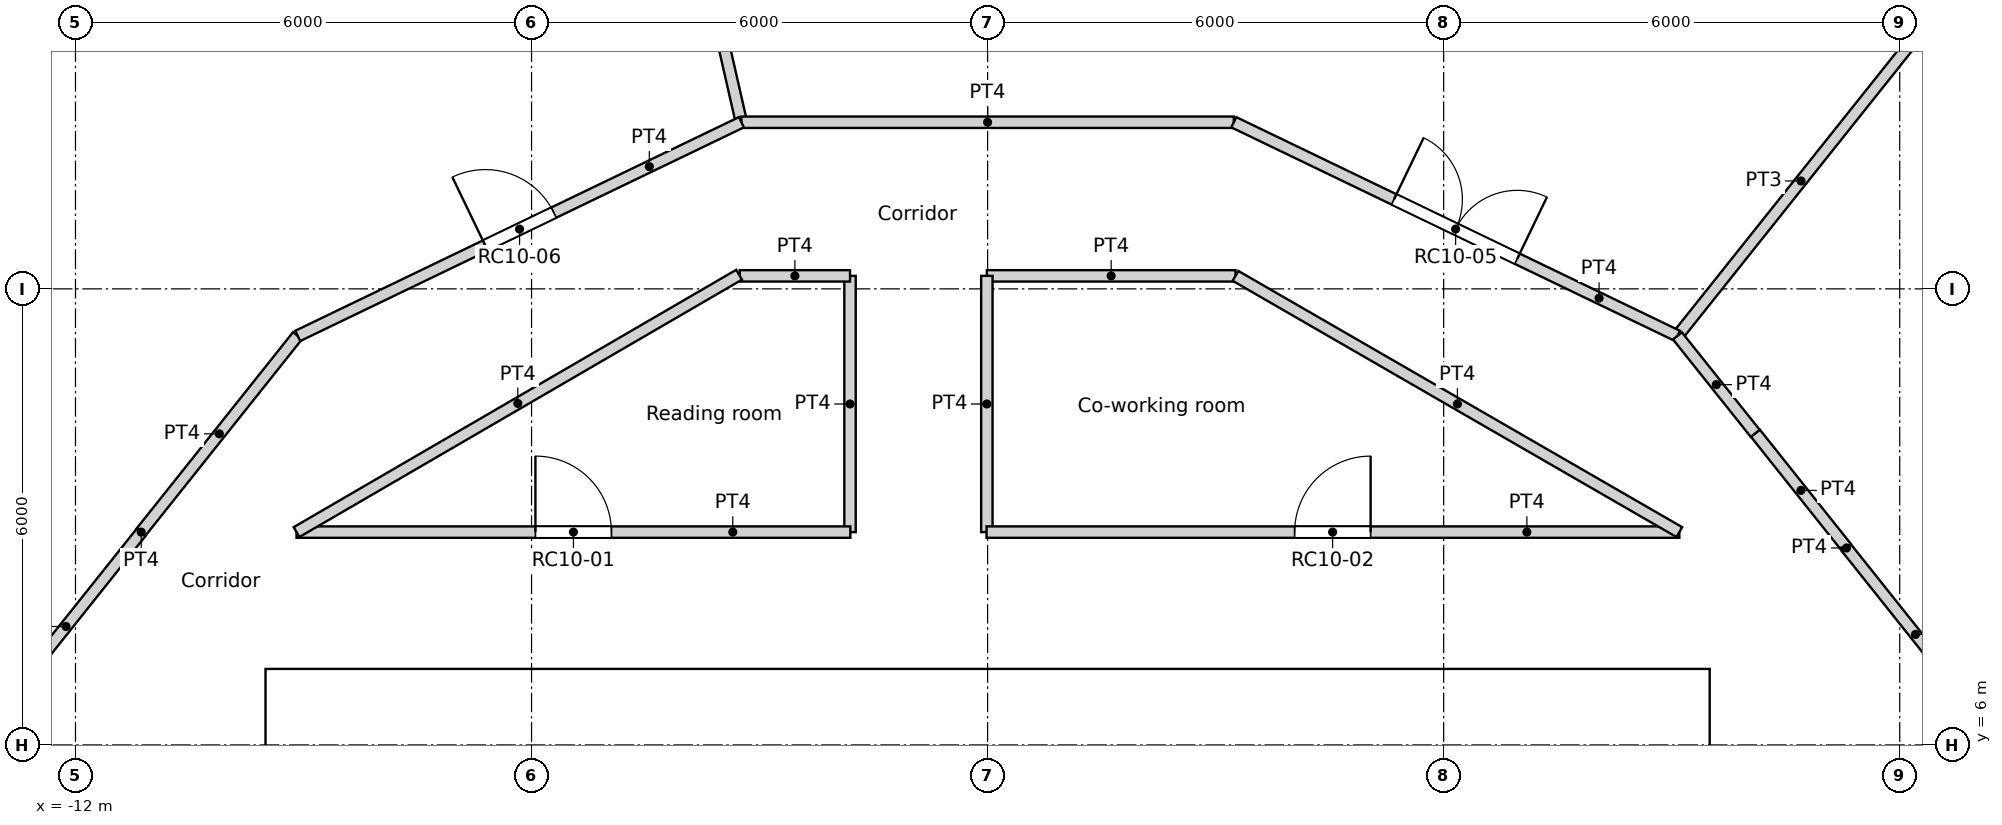
"""IFC4 building model, lengths in metres.
Left out: names, types, materials, properties, quantities, classifications, styles, units other than length and angle.
Written with IfcOpenShell. Run it as: python <this file> out.ifc"""

import sys

from ifc_helpers import new_model, si_unit, direction, frame, frame_2d, origin, origin_2d, place, context, subcontext, project, spatial, rectangle, circle, extrude, element, fill, save


model = new_model("IFC4")
c1 = context("Model", 3, precision=1e-05, world=origin(), true_north=direction((0.0, 1.0)))
c2 = subcontext(c1, "Body", "Model", "MODEL_VIEW")
j1 = project(units=[si_unit("LENGTHUNIT", "METRE"), si_unit("PLANEANGLEUNIT", "RADIAN")], contexts=[c1])
p1 = place(None, origin())
s1 = spatial("IfcSite", under=j1, at=p1, CompositionType="ELEMENT")
p2 = place(p1, origin())
s2 = spatial("IfcBuilding", under=s1, at=p2, CompositionType="ELEMENT")
p3 = place(p2, frame((0.0, 0.0, 323.4)))
s3 = spatial("IfcBuildingStorey", under=s2, at=p3, CompositionType="ELEMENT", Elevation=323.4)
p4 = place(p3, frame((11.735, 14.716, 0.0), z_axis=(0.0, 0.0, 1.0), x_axis=(1.0, 0.0, 0.0)))
e1 = element("IfcColumn", 1, at=p4, inside=s3, PredefinedType="COLUMN", context=c2, shape_type="SweptSolid", body=[
    extrude(circle(Radius=0.45, at=origin_2d()), origin(), (0.0, 0.0, 1.0), 3.6),
])
p5 = place(p3, frame((-9.5, 6.7, 0.0), z_axis=(0.0, 0.0, 1.0), x_axis=(1.0, 0.0, 0.0)))
e2 = element("IfcWall", 2, at=p5, inside=s3, PredefinedType="SOLIDWALL", context=c2, shape_type="SweptSolid", body=[
    extrude(rectangle(XDim=19.0, YDim=0.6, at=frame_2d((9.5, 0.0))), origin(), (0.0, 0.0, 1.0), 3.6),
])
p6 = place(p5, frame((5.35, 0.0, 0.0)))
e3 = element("IfcOpeningElement", 3, at=p6, cuts=e2, PredefinedType="OPENING", context=c2, shape_type="SweptSolid", body=[
    extrude(rectangle(XDim=1.7, YDim=2.1, at=frame_2d((0.85, 1.05))), frame((0.0, 0.3, 0.0), z_axis=(0.0, -1.0, 0.0), x_axis=(1.0, 0.0, 0.0)), (0.0, 0.0, 1.0), 0.6),
])
p7 = place(p3, frame((-9.2, -6.4, 0.0), z_axis=(0.0, 0.0, 1.0), x_axis=(0.0, 1.0, 0.0)))
e4 = element("IfcWall", 4, at=p7, inside=s3, PredefinedType="SOLIDWALL", context=c2, shape_type="SweptSolid", body=[
    extrude(rectangle(XDim=12.8, YDim=0.6, at=frame_2d((6.4, 0.0))), origin(), (0.0, 0.0, 1.0), 3.6),
])
p8 = place(p3, frame((9.2, -6.4, 0.0), z_axis=(0.0, 0.0, 1.0), x_axis=(0.0, 1.0, 0.0)))
e5 = element("IfcWall", 5, at=p8, inside=s3, PredefinedType="SOLIDWALL", context=c2, shape_type="SweptSolid", body=[
    extrude(rectangle(XDim=12.8, YDim=0.6, at=frame_2d((6.4, 0.0))), origin(), (0.0, 0.0, 1.0), 3.6),
])
p9 = place(p8, frame((6.4, 0.0, 0.0)))
e6 = element("IfcOpeningElement", 6, at=p9, cuts=e5, PredefinedType="OPENING", context=c2, shape_type="SweptSolid", body=[
    extrude(rectangle(XDim=1.8, YDim=2.1, at=frame_2d((0.9, 1.05))), frame((0.0, 0.3, 0.0), z_axis=(0.0, -1.0, 0.0), x_axis=(1.0, 0.0, 0.0)), (0.0, 0.0, 1.0), 0.6),
])
for number, where, z_axis, x_axis in (
    (7, (-2.25, 3.25, 0.0), (0.0, 0.0, 1.0), (0.0, 1.0, 0.0)),
    (8, (0.55, 3.25, 0.0), (0.0, 0.0, 1.0), (0.0, 1.0, 0.0)),
    (9, (3.35, 3.25, 0.0), (0.0, 0.0, 1.0), (0.0, 1.0, 0.0)),
    (10, (6.15, 3.25, 0.0), (0.0, 0.0, 1.0), (0.0, 1.0, 0.0)),
):
    element("IfcWall", number, at=place(p3, frame(where, z_axis=z_axis, x_axis=x_axis)), inside=s3, PredefinedType="SOLIDWALL", context=c2, shape_type="SweptSolid", body=[
        extrude(rectangle(XDim=3.15, YDim=0.3, at=frame_2d((1.575, 0.0))), origin(), (0.0, 0.0, 1.0), 3.25),
    ])
p10 = place(p3, frame((-9.092, 8.8, 0.0), z_axis=(0.0, 0.0, 1.0), x_axis=(0.864470922103, 0.502682827277, 0.0)))
e11 = element("IfcWall", 11, at=p10, inside=s3, PredefinedType="PARTITIONING", context=c2, shape_type="SweptSolid", body=[
    extrude(rectangle(XDim=6.735, YDim=0.15, at=frame_2d((3.368, 0.0))), origin(), (0.0, 0.0, 1.0), 3.25),
])
p11 = place(p3, frame((-9.092, 8.8, 0.0), z_axis=(0.0, 0.0, 1.0), x_axis=(1.0, 0.0, 0.0)))
e12 = element("IfcWall", 12, at=p11, inside=s3, PredefinedType="PARTITIONING", context=c2, shape_type="SweptSolid", body=[
    extrude(rectangle(XDim=7.286, YDim=0.15, at=frame_2d((3.643, 0.0))), origin(), (0.0, 0.0, 1.0), 3.25),
])
p12 = place(p11, frame((3.143, 0.0, 0.0)))
e13 = element("IfcOpeningElement", 13, at=p12, cuts=e12, PredefinedType="OPENING", context=c2, shape_type="SweptSolid", body=[
    extrude(rectangle(XDim=1.0, YDim=2.04, at=frame_2d((0.5, 1.02))), frame((0.0, 0.075, 0.0), z_axis=(0.0, -1.0, 0.0), x_axis=(1.0, 0.0, 0.0)), (0.0, 0.0, 1.0), 0.15),
])
p13 = place(p3, frame((-0.014, 8.8, 0.0), z_axis=(0.0, 0.0, 1.0), x_axis=(1.0, 0.0, 0.0)))
e14 = element("IfcWall", 14, at=p13, inside=s3, PredefinedType="PARTITIONING", context=c2, shape_type="SweptSolid", body=[
    extrude(rectangle(XDim=9.115, YDim=0.15, at=frame_2d((4.557, 0.0))), origin(), (0.0, 0.0, 1.0), 3.25),
])
p14 = place(p13, frame((4.053, 0.0, 0.0)))
e15 = element("IfcOpeningElement", 15, at=p14, cuts=e14, PredefinedType="OPENING", context=c2, shape_type="SweptSolid", body=[
    extrude(rectangle(XDim=1.0, YDim=2.04, at=frame_2d((0.5, 1.02))), frame((0.0, 0.075, 0.0), z_axis=(0.0, -1.0, 0.0), x_axis=(1.0, 0.0, 0.0)), (0.0, 0.0, 1.0), 0.15),
])
p15 = place(p3, frame((10.101, 10.101, 0.0), z_axis=(0.0, 0.0, 1.0), x_axis=(0.623130947784, -0.782117524362, 0.0)))
e16 = element("IfcWall", 16, at=p15, inside=s3, PredefinedType="PARTITIONING", context=c2, shape_type="SweptSolid", body=[
    extrude(rectangle(XDim=1.924, YDim=0.15, at=frame_2d((0.962, 0.0))), origin(), (0.0, 0.0, 1.0), 3.25),
])
p16 = place(p3, frame((11.3, 8.586, 0.0), z_axis=(0.0, 0.0, 1.0), x_axis=(0.0, 1.0, 0.0)))
e17 = element("IfcWall", 17, at=p16, inside=s3, PredefinedType="PARTITIONING", context=c2, shape_type="SweptSolid", body=[
    extrude(rectangle(XDim=0.01, YDim=0.15, at=frame_2d((0.005, 0.0))), origin(), (0.0, 0.0, 1.0), 3.25),
])
p17 = place(p3, frame((-11.134, 8.8, 0.0), z_axis=(0.0, 0.0, 1.0), x_axis=(-1.0, 0.0, 0.0)))
e18 = element("IfcWall", 18, at=p17, inside=s3, PredefinedType="PARTITIONING", context=c2, shape_type="SweptSolid", body=[
    extrude(rectangle(XDim=0.003, YDim=0.15, at=frame_2d((0.001, 0.0))), origin(), (0.0, 0.0, 1.0), 3.25),
])
p18 = place(p3, frame((-11.136, 8.802, 0.0), z_axis=(0.0, 0.0, 1.0), x_axis=(0.623151397235, 0.782101231379, 0.0)))
e19 = element("IfcWall", 19, at=p18, inside=s3, PredefinedType="PARTITIONING", context=c2, shape_type="SweptSolid", body=[
    extrude(rectangle(XDim=3.301, YDim=0.15, at=frame_2d((1.65, 0.0))), origin(), (0.0, 0.0, 1.0), 3.25),
])
p19 = place(p3, frame((11.3, 8.592, 0.0), z_axis=(0.0, 0.0, 1.0), x_axis=(0.623446514299, -0.781866001185, 0.0)))
e20 = element("IfcWall", 20, at=p19, inside=s3, PredefinedType="PARTITIONING", context=c2, shape_type="SweptSolid", body=[
    extrude(rectangle(XDim=2.911, YDim=0.15, at=frame_2d((1.456, 0.0))), origin(), (0.0, 0.0, 1.0), 3.25),
])
p20 = place(p3, frame((-1.81, 8.8, 0.0), z_axis=(0.0, 0.0, 1.0), x_axis=(0.0, 1.0, 0.0)))
e21 = element("IfcWall", 21, at=p20, inside=s3, PredefinedType="PARTITIONING", context=c2, shape_type="SweptSolid", body=[
    extrude(rectangle(XDim=3.371, YDim=0.15, at=frame_2d((1.686, 0.0))), origin(), (0.0, 0.0, 1.0), 3.25),
])
p21 = place(p3, frame((-3.261, 12.171, 0.0), z_axis=(0.0, 0.0, 1.0), x_axis=(1.0, 0.0, 0.0)))
e22 = element("IfcWall", 22, at=p21, inside=s3, PredefinedType="PARTITIONING", context=c2, shape_type="SweptSolid", body=[
    extrude(rectangle(XDim=1.451, YDim=0.15, at=frame_2d((0.726, 0.0))), origin(), (0.0, 0.0, 1.0), 3.25),
])
p22 = place(p3, frame((3.261, 12.171, 0.0), z_axis=(0.0, 0.0, 1.0), x_axis=(0.866066809554, -0.499928276245, 0.0)))
e23 = element("IfcWall", 23, at=p22, inside=s3, PredefinedType="PARTITIONING", context=c2, shape_type="SweptSolid", body=[
    extrude(rectangle(XDim=6.743, YDim=0.15, at=frame_2d((3.371, 0.0))), origin(), (0.0, 0.0, 1.0), 3.25),
])
p23 = place(p3, frame((-0.01, 12.171, 0.0), z_axis=(0.0, 0.0, 1.0), x_axis=(1.0, 0.0, 0.0)))
e24 = element("IfcWall", 24, at=p23, inside=s3, PredefinedType="PARTITIONING", context=c2, shape_type="SweptSolid", body=[
    extrude(rectangle(XDim=3.271, YDim=0.15, at=frame_2d((1.635, 0.0))), origin(), (0.0, 0.0, 1.0), 3.25),
])
p24 = place(p3, frame((-0.01, 8.8, 0.0), z_axis=(0.0, 0.0, 1.0), x_axis=(0.0, 1.0, 0.0)))
e25 = element("IfcWall", 25, at=p24, inside=s3, PredefinedType="PARTITIONING", context=c2, shape_type="SweptSolid", body=[
    extrude(rectangle(XDim=3.371, YDim=0.15, at=frame_2d((1.686, 0.0))), origin(), (0.0, 0.0, 1.0), 3.25),
])
p25 = place(p3, frame((9.076, 11.381, 0.0), z_axis=(0.0, 0.0, 1.0), x_axis=(0.623805208652, -0.781579849829, 0.0)))
e26 = element("IfcWall", 26, at=p25, inside=s3, PredefinedType="PARTITIONING", context=c2, shape_type="SweptSolid", body=[
    extrude(rectangle(XDim=1.64, YDim=0.15, at=frame_2d((0.82, 0.0))), origin(), (0.0, 0.0, 1.0), 3.25),
])
p26 = place(p3, frame((-3.239, 14.192, 0.0), z_axis=(0.0, 0.0, 1.0), x_axis=(1.0, 0.0, 0.0)))
e27 = element("IfcWall", 27, at=p26, inside=s3, PredefinedType="PARTITIONING", context=c2, shape_type="SweptSolid", body=[
    extrude(rectangle(XDim=6.478, YDim=0.15, at=frame_2d((3.239, 0.0))), origin(), (0.0, 0.0, 1.0), 3.25),
])
p27 = place(p3, frame((3.239, 14.192, 0.0), z_axis=(0.0, 0.0, 1.0), x_axis=(0.900976027191, -0.433868872388, 0.0)))
e28 = element("IfcWall", 28, at=p27, inside=s3, PredefinedType="PARTITIONING", context=c2, shape_type="SweptSolid", body=[
    extrude(rectangle(XDim=6.479, YDim=0.15, at=frame_2d((3.239, 0.0))), origin(), (0.0, 0.0, 1.0), 3.25),
])
p28 = place(p27, frame((2.339, 0.0, 0.0)))
e29 = element("IfcOpeningElement", 29, at=p28, cuts=e28, PredefinedType="OPENING", context=c2, shape_type="SweptSolid", body=[
    extrude(rectangle(XDim=1.8, YDim=2.1, at=frame_2d((0.9, 1.05))), frame((0.0, 0.075, 0.0), z_axis=(0.0, -1.0, 0.0), x_axis=(1.0, 0.0, 0.0)), (0.0, 0.0, 1.0), 0.15),
])
p29 = place(p3, frame((-9.076, 11.381, 0.0), z_axis=(0.0, 0.0, 1.0), x_axis=(0.900976027191, 0.433868872388, 0.0)))
e30 = element("IfcWall", 30, at=p29, inside=s3, PredefinedType="PARTITIONING", context=c2, shape_type="SweptSolid", body=[
    extrude(rectangle(XDim=6.479, YDim=0.15, at=frame_2d((3.239, 0.0))), origin(), (0.0, 0.0, 1.0), 3.25),
])
p30 = place(p29, frame((2.739, 0.0, 0.0)))
e31 = element("IfcOpeningElement", 31, at=p30, cuts=e30, PredefinedType="OPENING", context=c2, shape_type="SweptSolid", body=[
    extrude(rectangle(XDim=1.0, YDim=2.04, at=frame_2d((0.5, 1.02))), frame((0.0, 0.075, 0.0), z_axis=(0.0, -1.0, 0.0), x_axis=(1.0, 0.0, 0.0)), (0.0, 0.0, 1.0), 0.15),
])
p31 = place(p3, frame((-13.115, 6.316, 0.0), z_axis=(0.0, 0.0, 1.0), x_axis=(0.623476099415, 0.781842409606, 0.0)))
e32 = element("IfcWall", 32, at=p31, inside=s3, PredefinedType="PARTITIONING", context=c2, shape_type="SweptSolid", body=[
    extrude(rectangle(XDim=3.177, YDim=0.15, at=frame_2d((1.589, 0.0))), origin(), (0.0, 0.0, 1.0), 3.25),
])
p32 = place(p3, frame((9.076, 11.381, 0.0), z_axis=(0.0, 0.0, 1.0), x_axis=(0.623460949534, 0.781854490558, 0.0)))
e33 = element("IfcWall", 33, at=p32, inside=s3, PredefinedType="PARTITIONING", context=c2, shape_type="SweptSolid", body=[
    extrude(rectangle(XDim=5.214, YDim=0.15, at=frame_2d((2.607, 0.0))), origin(), (0.0, 0.0, 1.0), 3.25),
])
p33 = place(p3, frame((-4.4, 19.276, 0.0), z_axis=(0.0, 0.0, 1.0), x_axis=(0.222612505682, -0.974907007008, 0.0)))
e34 = element("IfcWall", 34, at=p33, inside=s3, PredefinedType="PARTITIONING", context=c2, shape_type="SweptSolid", body=[
    extrude(rectangle(XDim=5.215, YDim=0.15, at=frame_2d((2.607, 0.0))), origin(), (0.0, 0.0, 1.0), 3.25),
])
p34 = place(p6, origin())
e35 = element("IfcDoor", 35, at=p34, inside=s3, OperationType="DOUBLE_DOOR_SINGLE_SWING", PredefinedType="DOOR", context=c2, shape_type="SweptSolid", body=[
    extrude(rectangle(XDim=1.7, YDim=2.1, at=frame_2d((0.85, 1.05))), frame((0.0, 0.025, 0.0), z_axis=(0.0, -1.0, 0.0), x_axis=(1.0, 0.0, 0.0)), (0.0, 0.0, 1.0), 0.05),
])
fill(e3, e35)
p35 = place(p12, origin())
e36 = element("IfcDoor", 36, at=p35, inside=s3, OperationType="SINGLE_SWING_LEFT", PredefinedType="DOOR", context=c2, shape_type="SweptSolid", body=[
    extrude(rectangle(XDim=1.0, YDim=2.04, at=frame_2d((0.5, 1.02))), frame((0.0, 0.025, 0.0), z_axis=(0.0, -1.0, 0.0), x_axis=(1.0, 0.0, 0.0)), (0.0, 0.0, 1.0), 0.05),
])
fill(e13, e36)
p36 = place(p14, origin())
e37 = element("IfcDoor", 37, at=p36, inside=s3, OperationType="SINGLE_SWING_RIGHT", PredefinedType="DOOR", context=c2, shape_type="SweptSolid", body=[
    extrude(rectangle(XDim=1.0, YDim=2.04, at=frame_2d((0.5, 1.02))), frame((0.0, 0.025, 0.0), z_axis=(0.0, -1.0, 0.0), x_axis=(1.0, 0.0, 0.0)), (0.0, 0.0, 1.0), 0.05),
])
fill(e15, e37)
p37 = place(p28, origin())
e38 = element("IfcDoor", 38, at=p37, inside=s3, OperationType="DOUBLE_DOOR_SINGLE_SWING", PredefinedType="DOOR", context=c2, shape_type="SweptSolid", body=[
    extrude(rectangle(XDim=1.8, YDim=2.1, at=frame_2d((0.9, 1.05))), frame((0.0, 0.025, 0.0), z_axis=(0.0, -1.0, 0.0), x_axis=(1.0, 0.0, 0.0)), (0.0, 0.0, 1.0), 0.05),
])
fill(e29, e38)
p38 = place(p30, origin())
e39 = element("IfcDoor", 39, at=p38, inside=s3, OperationType="SINGLE_SWING_LEFT", PredefinedType="DOOR", context=c2, shape_type="SweptSolid", body=[
    extrude(rectangle(XDim=1.0, YDim=2.04, at=frame_2d((0.5, 1.02))), frame((0.0, 0.025, 0.0), z_axis=(0.0, -1.0, 0.0), x_axis=(1.0, 0.0, 0.0)), (0.0, 0.0, 1.0), 0.05),
])
fill(e31, e39)
save(model, sys.argv[1])
